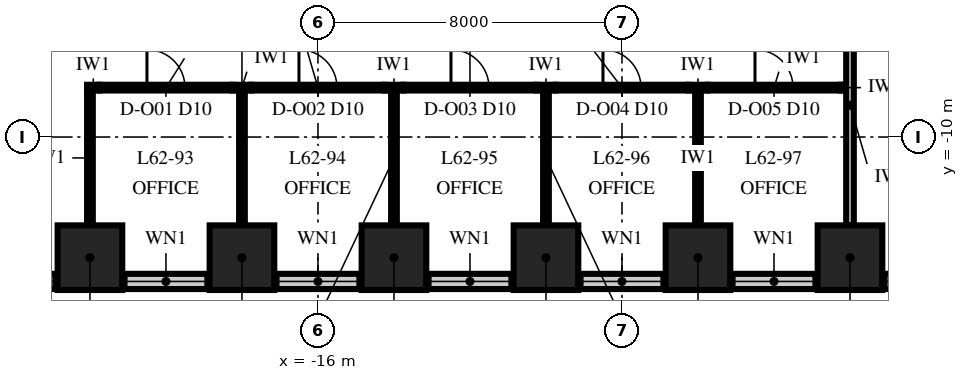
"""IFC4 building model, lengths in metres.
Left out: names, types, materials, properties, quantities, classifications, styles, units other than length and angle.
Written with IfcOpenShell. Run it as: python <this file> out.ifc"""

import sys

from ifc_helpers import new_model, si_unit, direction, frame, frame_2d, origin, origin_2d, place, context, subcontext, project, spatial, rectangle, extrude, element, fill, save


model = new_model("IFC4")
c1 = context("Model", 3, precision=1e-05, world=origin(), true_north=direction((0.0, 1.0)))
c2 = subcontext(c1, "Body", "Model", "MODEL_VIEW")
j1 = project(units=[si_unit("LENGTHUNIT", "METRE"), si_unit("PLANEANGLEUNIT", "RADIAN")], contexts=[c1])
p1 = place(None, origin())
s1 = spatial("IfcSite", under=j1, at=p1, CompositionType="ELEMENT")
p2 = place(p1, origin())
s2 = spatial("IfcBuilding", under=s1, at=p2, CompositionType="ELEMENT")
p3 = place(p2, frame((0.0, 0.0, 268.0)))
s3 = spatial("IfcBuildingStorey", under=s2, at=p3, CompositionType="ELEMENT", Elevation=268.0)
for number, where, z_axis, x_axis in (
    (1, (-22.0, -13.175, 0.0), (0.0, 0.0, 1.0), (1.0, 0.0, 0.0)),
    (2, (-18.0, -13.175, 0.0), (0.0, 0.0, 1.0), (1.0, 0.0, 0.0)),
    (3, (-14.0, -13.175, 0.0), (0.0, 0.0, 1.0), (1.0, 0.0, 0.0)),
    (4, (-10.0, -13.175, 0.0), (0.0, 0.0, 1.0), (1.0, 0.0, 0.0)),
    (5, (-6.0, -13.175, 0.0), (0.0, 0.0, 1.0), (1.0, 0.0, 0.0)),
    (6, (-2.0, -13.175, 0.0), (0.0, 0.0, 1.0), (1.0, 0.0, 0.0)),
):
    element("IfcColumn", number, at=place(p3, frame(where, z_axis=z_axis, x_axis=x_axis)), inside=s3, PredefinedType="COLUMN", context=c2, shape_type="SweptSolid", body=[
        extrude(rectangle(XDim=1.7, YDim=1.7, at=origin_2d()), origin(), (0.0, 0.0, 1.0), 3.75),
    ])
p4 = place(p3, frame((-26.0, -13.8, 0.0), z_axis=(0.0, 0.0, 1.0), x_axis=(1.0, 0.0, 0.0)))
e7 = element("IfcWall", 7, at=p4, inside=s3, PredefinedType="SOLIDWALL", context=c2, shape_type="SweptSolid", body=[
    extrude(rectangle(XDim=52.0, YDim=0.4, at=frame_2d((26.0, 0.0))), origin(), (0.0, 0.0, 1.0), 2.0),
])
p5 = place(p4, frame((0.95, 0.0, 0.8)))
e8 = element("IfcOpeningElement", 8, at=p5, cuts=e7, PredefinedType="OPENING", context=c2, shape_type="SweptSolid", body=[
    extrude(rectangle(XDim=2.1, YDim=1.15, at=frame_2d((1.05, 0.575))), frame((0.0, 0.215, 0.0), z_axis=(0.0, -1.0, 0.0), x_axis=(1.0, 0.0, 0.0)), (0.0, 0.0, 1.0), 0.43),
])
p6 = place(p4, frame((4.95, 0.0, 0.8)))
e9 = element("IfcOpeningElement", 9, at=p6, cuts=e7, PredefinedType="OPENING", context=c2, shape_type="SweptSolid", body=[
    extrude(rectangle(XDim=2.1, YDim=1.15, at=frame_2d((1.05, 0.575))), frame((0.0, 0.215, 0.0), z_axis=(0.0, -1.0, 0.0), x_axis=(1.0, 0.0, 0.0)), (0.0, 0.0, 1.0), 0.43),
])
p7 = place(p4, frame((8.95, 0.0, 0.8)))
e10 = element("IfcOpeningElement", 10, at=p7, cuts=e7, PredefinedType="OPENING", context=c2, shape_type="SweptSolid", body=[
    extrude(rectangle(XDim=2.1, YDim=1.15, at=frame_2d((1.05, 0.575))), frame((0.0, 0.215, 0.0), z_axis=(0.0, -1.0, 0.0), x_axis=(1.0, 0.0, 0.0)), (0.0, 0.0, 1.0), 0.43),
])
p8 = place(p4, frame((12.95, 0.0, 0.8)))
e11 = element("IfcOpeningElement", 11, at=p8, cuts=e7, PredefinedType="OPENING", context=c2, shape_type="SweptSolid", body=[
    extrude(rectangle(XDim=2.1, YDim=1.15, at=frame_2d((1.05, 0.575))), frame((0.0, 0.215, 0.0), z_axis=(0.0, -1.0, 0.0), x_axis=(1.0, 0.0, 0.0)), (0.0, 0.0, 1.0), 0.43),
])
p9 = place(p4, frame((16.95, 0.0, 0.8)))
e12 = element("IfcOpeningElement", 12, at=p9, cuts=e7, PredefinedType="OPENING", context=c2, shape_type="SweptSolid", body=[
    extrude(rectangle(XDim=2.1, YDim=1.15, at=frame_2d((1.05, 0.575))), frame((0.0, 0.215, 0.0), z_axis=(0.0, -1.0, 0.0), x_axis=(1.0, 0.0, 0.0)), (0.0, 0.0, 1.0), 0.43),
])
p10 = place(p4, frame((20.95, 0.0, 0.8)))
e13 = element("IfcOpeningElement", 13, at=p10, cuts=e7, PredefinedType="OPENING", context=c2, shape_type="SweptSolid", body=[
    extrude(rectangle(XDim=2.1, YDim=1.15, at=frame_2d((1.05, 0.575))), frame((0.0, 0.215, 0.0), z_axis=(0.0, -1.0, 0.0), x_axis=(1.0, 0.0, 0.0)), (0.0, 0.0, 1.0), 0.43),
])
p11 = place(p4, frame((24.95, 0.0, 0.8)))
e14 = element("IfcOpeningElement", 14, at=p11, cuts=e7, PredefinedType="OPENING", context=c2, shape_type="SweptSolid", body=[
    extrude(rectangle(XDim=2.1, YDim=1.15, at=frame_2d((1.05, 0.575))), frame((0.0, 0.215, 0.0), z_axis=(0.0, -1.0, 0.0), x_axis=(1.0, 0.0, 0.0)), (0.0, 0.0, 1.0), 0.43),
])
p12 = place(p4, frame((28.95, 0.0, 0.8)))
e15 = element("IfcOpeningElement", 15, at=p12, cuts=e7, PredefinedType="OPENING", context=c2, shape_type="SweptSolid", body=[
    extrude(rectangle(XDim=2.1, YDim=1.15, at=frame_2d((1.05, 0.575))), frame((0.0, 0.215, 0.0), z_axis=(0.0, -1.0, 0.0), x_axis=(1.0, 0.0, 0.0)), (0.0, 0.0, 1.0), 0.43),
])
p13 = place(p4, frame((32.95, 0.0, 0.8)))
e16 = element("IfcOpeningElement", 16, at=p13, cuts=e7, PredefinedType="OPENING", context=c2, shape_type="SweptSolid", body=[
    extrude(rectangle(XDim=2.1, YDim=1.15, at=frame_2d((1.05, 0.575))), frame((0.0, 0.215, 0.0), z_axis=(0.0, -1.0, 0.0), x_axis=(1.0, 0.0, 0.0)), (0.0, 0.0, 1.0), 0.43),
])
p14 = place(p4, frame((36.95, 0.0, 0.8)))
e17 = element("IfcOpeningElement", 17, at=p14, cuts=e7, PredefinedType="OPENING", context=c2, shape_type="SweptSolid", body=[
    extrude(rectangle(XDim=2.1, YDim=1.15, at=frame_2d((1.05, 0.575))), frame((0.0, 0.215, 0.0), z_axis=(0.0, -1.0, 0.0), x_axis=(1.0, 0.0, 0.0)), (0.0, 0.0, 1.0), 0.43),
])
p15 = place(p4, frame((40.95, 0.0, 0.8)))
e18 = element("IfcOpeningElement", 18, at=p15, cuts=e7, PredefinedType="OPENING", context=c2, shape_type="SweptSolid", body=[
    extrude(rectangle(XDim=2.1, YDim=1.15, at=frame_2d((1.05, 0.575))), frame((0.0, 0.215, 0.0), z_axis=(0.0, -1.0, 0.0), x_axis=(1.0, 0.0, 0.0)), (0.0, 0.0, 1.0), 0.43),
])
p16 = place(p4, frame((44.95, 0.0, 0.8)))
e19 = element("IfcOpeningElement", 19, at=p16, cuts=e7, PredefinedType="OPENING", context=c2, shape_type="SweptSolid", body=[
    extrude(rectangle(XDim=2.1, YDim=1.15, at=frame_2d((1.05, 0.575))), frame((0.0, 0.215, 0.0), z_axis=(0.0, -1.0, 0.0), x_axis=(1.0, 0.0, 0.0)), (0.0, 0.0, 1.0), 0.43),
])
p17 = place(p4, frame((48.95, 0.0, 0.8)))
e20 = element("IfcOpeningElement", 20, at=p17, cuts=e7, PredefinedType="OPENING", context=c2, shape_type="SweptSolid", body=[
    extrude(rectangle(XDim=2.1, YDim=1.15, at=frame_2d((1.05, 0.575))), frame((0.0, 0.215, 0.0), z_axis=(0.0, -1.0, 0.0), x_axis=(1.0, 0.0, 0.0)), (0.0, 0.0, 1.0), 0.43),
])
p18 = place(p3, frame((-22.075, -8.7, 0.0), z_axis=(0.0, 0.0, 1.0), x_axis=(1.0, 0.0, 0.0)))
e21 = element("IfcWall", 21, at=p18, inside=s3, PredefinedType="PARTITIONING", context=c2, shape_type="SweptSolid", body=[
    extrude(rectangle(XDim=0.325, YDim=0.15, at=frame_2d((0.163, 0.0))), origin(), (0.0, 0.0, 1.0), 2.15),
])
p19 = place(p3, frame((-21.75, -8.7, 0.0), z_axis=(0.0, 0.0, 1.0), x_axis=(1.0, 0.0, 0.0)))
e22 = element("IfcWall", 22, at=p19, inside=s3, PredefinedType="PARTITIONING", context=c2, shape_type="SweptSolid", body=[
    extrude(rectangle(XDim=3.5, YDim=0.15, at=frame_2d((1.75, 0.0))), origin(), (0.0, 0.0, 1.0), 3.85),
])
p20 = place(p19, frame((1.25, 0.0, 0.0)))
e23 = element("IfcOpeningElement", 23, at=p20, cuts=e22, PredefinedType="OPENING", context=c2, shape_type="SweptSolid", body=[
    extrude(rectangle(XDim=1.0, YDim=2.3, at=frame_2d((0.5, 1.15))), frame((0.0, 0.09, 0.0), z_axis=(0.0, -1.0, 0.0), x_axis=(1.0, 0.0, 0.0)), (0.0, 0.0, 1.0), 0.18),
])
p21 = place(p3, frame((-18.25, -8.7, 0.0), z_axis=(0.0, 0.0, 1.0), x_axis=(1.0, 0.0, 0.0)))
e24 = element("IfcWall", 24, at=p21, inside=s3, PredefinedType="PARTITIONING", context=c2, shape_type="SweptSolid", body=[
    extrude(rectangle(XDim=0.5, YDim=0.15, at=frame_2d((0.25, 0.0))), origin(), (0.0, 0.0, 1.0), 2.15),
])
p22 = place(p3, frame((-17.75, -8.7, 0.0), z_axis=(0.0, 0.0, 1.0), x_axis=(1.0, 0.0, 0.0)))
e25 = element("IfcWall", 25, at=p22, inside=s3, PredefinedType="PARTITIONING", context=c2, shape_type="SweptSolid", body=[
    extrude(rectangle(XDim=3.5, YDim=0.15, at=frame_2d((1.75, 0.0))), origin(), (0.0, 0.0, 1.0), 3.85),
])
p23 = place(p22, frame((1.25, 0.0, 0.0)))
e26 = element("IfcOpeningElement", 26, at=p23, cuts=e25, PredefinedType="OPENING", context=c2, shape_type="SweptSolid", body=[
    extrude(rectangle(XDim=1.0, YDim=2.3, at=frame_2d((0.5, 1.15))), frame((0.0, 0.09, 0.0), z_axis=(0.0, -1.0, 0.0), x_axis=(1.0, 0.0, 0.0)), (0.0, 0.0, 1.0), 0.18),
])
p24 = place(p3, frame((-14.25, -8.7, 0.0), z_axis=(0.0, 0.0, 1.0), x_axis=(1.0, 0.0, 0.0)))
e27 = element("IfcWall", 27, at=p24, inside=s3, PredefinedType="PARTITIONING", context=c2, shape_type="SweptSolid", body=[
    extrude(rectangle(XDim=0.5, YDim=0.15, at=frame_2d((0.25, 0.0))), origin(), (0.0, 0.0, 1.0), 2.15),
])
p25 = place(p3, frame((-13.75, -8.7, 0.0), z_axis=(0.0, 0.0, 1.0), x_axis=(1.0, 0.0, 0.0)))
e28 = element("IfcWall", 28, at=p25, inside=s3, PredefinedType="PARTITIONING", context=c2, shape_type="SweptSolid", body=[
    extrude(rectangle(XDim=3.5, YDim=0.15, at=frame_2d((1.75, 0.0))), origin(), (0.0, 0.0, 1.0), 3.85),
])
p26 = place(p25, frame((1.25, 0.0, 0.0)))
e29 = element("IfcOpeningElement", 29, at=p26, cuts=e28, PredefinedType="OPENING", context=c2, shape_type="SweptSolid", body=[
    extrude(rectangle(XDim=1.0, YDim=2.3, at=frame_2d((0.5, 1.15))), frame((0.0, 0.09, 0.0), z_axis=(0.0, -1.0, 0.0), x_axis=(1.0, 0.0, 0.0)), (0.0, 0.0, 1.0), 0.18),
])
p27 = place(p3, frame((-10.25, -8.7, 0.0), z_axis=(0.0, 0.0, 1.0), x_axis=(1.0, 0.0, 0.0)))
e30 = element("IfcWall", 30, at=p27, inside=s3, PredefinedType="PARTITIONING", context=c2, shape_type="SweptSolid", body=[
    extrude(rectangle(XDim=0.5, YDim=0.15, at=frame_2d((0.25, 0.0))), origin(), (0.0, 0.0, 1.0), 2.15),
])
p28 = place(p3, frame((-9.75, -8.7, 0.0), z_axis=(0.0, 0.0, 1.0), x_axis=(1.0, 0.0, 0.0)))
e31 = element("IfcWall", 31, at=p28, inside=s3, PredefinedType="PARTITIONING", context=c2, shape_type="SweptSolid", body=[
    extrude(rectangle(XDim=3.5, YDim=0.15, at=frame_2d((1.75, 0.0))), origin(), (0.0, 0.0, 1.0), 3.85),
])
p29 = place(p28, frame((1.25, 0.0, 0.0)))
e32 = element("IfcOpeningElement", 32, at=p29, cuts=e31, PredefinedType="OPENING", context=c2, shape_type="SweptSolid", body=[
    extrude(rectangle(XDim=1.0, YDim=2.3, at=frame_2d((0.5, 1.15))), frame((0.0, 0.09, 0.0), z_axis=(0.0, -1.0, 0.0), x_axis=(1.0, 0.0, 0.0)), (0.0, 0.0, 1.0), 0.18),
])
p30 = place(p3, frame((-6.25, -8.7, 0.0), z_axis=(0.0, 0.0, 1.0), x_axis=(1.0, 0.0, 0.0)))
e33 = element("IfcWall", 33, at=p30, inside=s3, PredefinedType="PARTITIONING", context=c2, shape_type="SweptSolid", body=[
    extrude(rectangle(XDim=0.5, YDim=0.15, at=frame_2d((0.25, 0.0))), origin(), (0.0, 0.0, 1.0), 2.15),
])
p31 = place(p3, frame((-5.75, -8.7, 0.0), z_axis=(0.0, 0.0, 1.0), x_axis=(1.0, 0.0, 0.0)))
e34 = element("IfcWall", 34, at=p31, inside=s3, PredefinedType="PARTITIONING", context=c2, shape_type="SweptSolid", body=[
    extrude(rectangle(XDim=3.5, YDim=0.15, at=frame_2d((1.75, 0.0))), origin(), (0.0, 0.0, 1.0), 3.85),
])
p32 = place(p31, frame((1.25, 0.0, 0.0)))
e35 = element("IfcOpeningElement", 35, at=p32, cuts=e34, PredefinedType="OPENING", context=c2, shape_type="SweptSolid", body=[
    extrude(rectangle(XDim=1.0, YDim=2.3, at=frame_2d((0.5, 1.15))), frame((0.0, 0.09, 0.0), z_axis=(0.0, -1.0, 0.0), x_axis=(1.0, 0.0, 0.0)), (0.0, 0.0, 1.0), 0.18),
])
p33 = place(p3, frame((-2.25, -8.7, 0.0), z_axis=(0.0, 0.0, 1.0), x_axis=(1.0, 0.0, 0.0)))
e36 = element("IfcWall", 36, at=p33, inside=s3, PredefinedType="PARTITIONING", context=c2, shape_type="SweptSolid", body=[
    extrude(rectangle(XDim=0.15, YDim=0.15, at=frame_2d((0.075, 0.0))), origin(), (0.0, 0.0, 1.0), 2.15),
])
for number, where, z_axis, x_axis in (
    (37, (-22.0, -12.325, 0.0), (0.0, 0.0, 1.0), (0.0, 1.0, 0.0)),
    (38, (-18.0, -12.325, 0.0), (0.0, 0.0, 1.0), (0.0, 1.0, 0.0)),
    (39, (-14.0, -12.325, 0.0), (0.0, 0.0, 1.0), (0.0, 1.0, 0.0)),
    (40, (-10.0, -12.325, 0.0), (0.0, 0.0, 1.0), (0.0, 1.0, 0.0)),
    (41, (-6.0, -12.325, 0.0), (0.0, 0.0, 1.0), (0.0, 1.0, 0.0)),
):
    element("IfcWall", number, at=place(p3, frame(where, z_axis=z_axis, x_axis=x_axis)), inside=s3, PredefinedType="PARTITIONING", context=c2, shape_type="SweptSolid", body=[
        extrude(rectangle(XDim=3.55, YDim=0.15, at=frame_2d((1.775, 0.0))), origin(), (0.0, 0.0, 1.0), 2.15),
    ])
p34 = place(p3, frame((-2.0, -12.325, 0.0), z_axis=(0.0, 0.0, 1.0), x_axis=(0.0, 1.0, 0.0)))
e42 = element("IfcWall", 42, at=p34, inside=s3, PredefinedType="PARTITIONING", context=c2, shape_type="SweptSolid", body=[
    extrude(rectangle(XDim=6.325, YDim=0.2, at=frame_2d((3.163, 0.0))), origin(), (0.0, 0.0, 1.0), 2.15),
])
p35 = place(p5, origin())
e43 = element("IfcWindow", 43, at=p35, inside=s3, PartitioningType="SINGLE_PANEL", PredefinedType="WINDOW", context=c2, shape_type="SweptSolid", body=[
    extrude(rectangle(XDim=2.1, YDim=1.15, at=frame_2d((1.05, 0.575))), frame((0.0, 0.03, 0.0), z_axis=(0.0, -1.0, 0.0), x_axis=(1.0, 0.0, 0.0)), (0.0, 0.0, 1.0), 0.06),
])
fill(e8, e43)
p36 = place(p6, origin())
e44 = element("IfcWindow", 44, at=p36, inside=s3, PartitioningType="SINGLE_PANEL", PredefinedType="WINDOW", context=c2, shape_type="SweptSolid", body=[
    extrude(rectangle(XDim=2.1, YDim=1.15, at=frame_2d((1.05, 0.575))), frame((0.0, 0.03, 0.0), z_axis=(0.0, -1.0, 0.0), x_axis=(1.0, 0.0, 0.0)), (0.0, 0.0, 1.0), 0.06),
])
fill(e9, e44)
p37 = place(p7, origin())
e45 = element("IfcWindow", 45, at=p37, inside=s3, PartitioningType="SINGLE_PANEL", PredefinedType="WINDOW", context=c2, shape_type="SweptSolid", body=[
    extrude(rectangle(XDim=2.1, YDim=1.15, at=frame_2d((1.05, 0.575))), frame((0.0, 0.03, 0.0), z_axis=(0.0, -1.0, 0.0), x_axis=(1.0, 0.0, 0.0)), (0.0, 0.0, 1.0), 0.06),
])
fill(e10, e45)
p38 = place(p8, origin())
e46 = element("IfcWindow", 46, at=p38, inside=s3, PartitioningType="SINGLE_PANEL", PredefinedType="WINDOW", context=c2, shape_type="SweptSolid", body=[
    extrude(rectangle(XDim=2.1, YDim=1.15, at=frame_2d((1.05, 0.575))), frame((0.0, 0.03, 0.0), z_axis=(0.0, -1.0, 0.0), x_axis=(1.0, 0.0, 0.0)), (0.0, 0.0, 1.0), 0.06),
])
fill(e11, e46)
p39 = place(p9, origin())
e47 = element("IfcWindow", 47, at=p39, inside=s3, PartitioningType="SINGLE_PANEL", PredefinedType="WINDOW", context=c2, shape_type="SweptSolid", body=[
    extrude(rectangle(XDim=2.1, YDim=1.15, at=frame_2d((1.05, 0.575))), frame((0.0, 0.03, 0.0), z_axis=(0.0, -1.0, 0.0), x_axis=(1.0, 0.0, 0.0)), (0.0, 0.0, 1.0), 0.06),
])
fill(e12, e47)
p40 = place(p10, origin())
e48 = element("IfcWindow", 48, at=p40, inside=s3, PartitioningType="SINGLE_PANEL", PredefinedType="WINDOW", context=c2, shape_type="SweptSolid", body=[
    extrude(rectangle(XDim=2.1, YDim=1.15, at=frame_2d((1.05, 0.575))), frame((0.0, 0.03, 0.0), z_axis=(0.0, -1.0, 0.0), x_axis=(1.0, 0.0, 0.0)), (0.0, 0.0, 1.0), 0.06),
])
fill(e13, e48)
p41 = place(p11, origin())
e49 = element("IfcWindow", 49, at=p41, inside=s3, PartitioningType="SINGLE_PANEL", PredefinedType="WINDOW", context=c2, shape_type="SweptSolid", body=[
    extrude(rectangle(XDim=2.1, YDim=1.15, at=frame_2d((1.05, 0.575))), frame((0.0, 0.03, 0.0), z_axis=(0.0, -1.0, 0.0), x_axis=(1.0, 0.0, 0.0)), (0.0, 0.0, 1.0), 0.06),
])
fill(e14, e49)
p42 = place(p20, origin())
e50 = element("IfcDoor", 50, at=p42, inside=s3, OperationType="SINGLE_SWING_LEFT", PredefinedType="DOOR", context=c2, shape_type="SweptSolid", body=[
    extrude(rectangle(XDim=1.0, YDim=2.3, at=frame_2d((0.5, 1.15))), frame((0.0, 0.075, 0.0), z_axis=(0.0, -1.0, 0.0), x_axis=(1.0, 0.0, 0.0)), (0.0, 0.0, 1.0), 0.149),
])
fill(e23, e50)
p43 = place(p23, origin())
e51 = element("IfcDoor", 51, at=p43, inside=s3, OperationType="SINGLE_SWING_LEFT", PredefinedType="DOOR", context=c2, shape_type="SweptSolid", body=[
    extrude(rectangle(XDim=1.0, YDim=2.3, at=frame_2d((0.5, 1.15))), frame((0.0, 0.075, 0.0), z_axis=(0.0, -1.0, 0.0), x_axis=(1.0, 0.0, 0.0)), (0.0, 0.0, 1.0), 0.149),
])
fill(e26, e51)
p44 = place(p26, origin())
e52 = element("IfcDoor", 52, at=p44, inside=s3, OperationType="SINGLE_SWING_LEFT", PredefinedType="DOOR", context=c2, shape_type="SweptSolid", body=[
    extrude(rectangle(XDim=1.0, YDim=2.3, at=frame_2d((0.5, 1.15))), frame((0.0, 0.075, 0.0), z_axis=(0.0, -1.0, 0.0), x_axis=(1.0, 0.0, 0.0)), (0.0, 0.0, 1.0), 0.149),
])
fill(e29, e52)
p45 = place(p29, origin())
e53 = element("IfcDoor", 53, at=p45, inside=s3, OperationType="SINGLE_SWING_LEFT", PredefinedType="DOOR", context=c2, shape_type="SweptSolid", body=[
    extrude(rectangle(XDim=1.0, YDim=2.3, at=frame_2d((0.5, 1.15))), frame((0.0, 0.075, 0.0), z_axis=(0.0, -1.0, 0.0), x_axis=(1.0, 0.0, 0.0)), (0.0, 0.0, 1.0), 0.149),
])
fill(e32, e53)
p46 = place(p32, origin())
e54 = element("IfcDoor", 54, at=p46, inside=s3, OperationType="SINGLE_SWING_LEFT", PredefinedType="DOOR", context=c2, shape_type="SweptSolid", body=[
    extrude(rectangle(XDim=1.0, YDim=2.3, at=frame_2d((0.5, 1.15))), frame((0.0, 0.075, 0.0), z_axis=(0.0, -1.0, 0.0), x_axis=(1.0, 0.0, 0.0)), (0.0, 0.0, 1.0), 0.149),
])
fill(e35, e54)
save(model, sys.argv[1])
